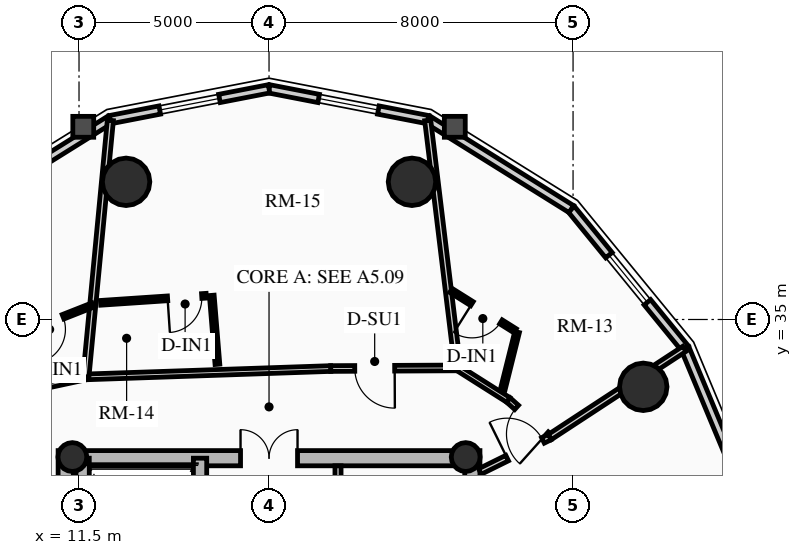
"""IFC4 building model, lengths in metres.
Left out: names, types, materials, properties, quantities, classifications, styles, units other than length and angle.
Written with IfcOpenShell. Run it as: python <this file> out.ifc"""

import sys

from ifc_helpers import new_model, si_unit, direction, frame, frame_2d, origin, origin_2d, place, context, subcontext, project, spatial, rectangle, circle, hollow_circle, extrude, source, transform, mapped, element, fill, save


model = new_model("IFC4")
c1 = context("Model", 3, precision=1e-05, world=origin(), true_north=direction((0.0, 1.0)))
c2 = subcontext(c1, "Body", "Model", "MODEL_VIEW")
j1 = project(units=[si_unit("LENGTHUNIT", "METRE"), si_unit("PLANEANGLEUNIT", "RADIAN")], contexts=[c1])
p1 = place(None, origin())
s1 = spatial("IfcSite", under=j1, at=p1, CompositionType="ELEMENT")
p2 = place(p1, origin())
s2 = spatial("IfcBuilding", under=s1, at=p2, CompositionType="ELEMENT")
p3 = place(p2, frame((0.0, 0.0, 183.61)))
s3 = spatial("IfcBuildingStorey", under=s2, at=p3, CompositionType="ELEMENT", Elevation=183.61)
for number, where, z_axis, x_axis in (
    (1, (11.15, 17.45, 0.0), (0.0, 0.0, 1.0), (0.0, 1.0, 0.0)),
    (2, (21.85, 17.45, 0.0), (0.0, 0.0, 1.0), (0.0, 1.0, 0.0)),
):
    element("IfcWall", number, at=place(p3, frame(where, z_axis=z_axis, x_axis=x_axis)), inside=s3, PredefinedType="SHEAR", context=c2, shape_type="SweptSolid", body=[
        extrude(rectangle(XDim=14.1, YDim=0.4, at=frame_2d((7.05, 0.0))), origin(), (0.0, 0.0, 1.0), 2.91),
    ])
p4 = place(p3, frame((11.15, 31.35, 0.0), z_axis=(0.0, 0.0, 1.0), x_axis=(1.0, 0.0, 0.0)))
e3 = element("IfcWall", 3, at=p4, inside=s3, PredefinedType="SHEAR", context=c2, shape_type="SweptSolid", body=[
    extrude(rectangle(XDim=10.7, YDim=0.4, at=frame_2d((5.35, 0.0))), origin(), (0.0, 0.0, 1.0), 2.91),
])
m1 = source(origin(), c2, "Body", "SweptSolid", [
    extrude(rectangle(XDim=1.5, YDim=2.02, at=frame_2d((0.75, 1.01))), frame((0.0, 0.21, 0.0), z_axis=(0.0, -1.0, 0.0), x_axis=(1.0, 0.0, 0.0)), (0.0, 0.0, 1.0), 0.42),
])
p5 = place(p4, frame((4.6, 0.0, 0.0)))
e4 = element("IfcOpeningElement", 4, at=p5, cuts=e3, PredefinedType="OPENING", context=c2, shape_type="MappedRepresentation", body=[
    mapped(m1, transform((0.0, 0.0, 0.0), x_axis=(1.0, 0.0, 0.0), y_axis=(0.0, 1.0, 0.0), z_axis=(0.0, 0.0, 1.0), scale=1.0)),
])
p6 = place(p3, frame((14.685, 17.65, 0.0), z_axis=(0.0, 0.0, 1.0), x_axis=(0.0, 1.0, 0.0)))
e5 = element("IfcWall", 5, at=p6, inside=s3, PredefinedType="SHEAR", context=c2, shape_type="SweptSolid", body=[
    extrude(rectangle(XDim=13.7, YDim=0.35, at=frame_2d((6.85, 0.0))), origin(), (0.0, 0.0, 1.0), 2.91),
])
m2 = source(origin(), c2, "Body", "SweptSolid", [
    extrude(rectangle(XDim=1.1, YDim=2.015, at=frame_2d((0.55, 1.007))), frame((0.0, 0.185, 0.0), z_axis=(0.0, -1.0, 0.0), x_axis=(1.0, 0.0, 0.0)), (0.0, 0.0, 1.0), 0.37),
])
p7 = place(p6, frame((4.85, 0.0, 0.0)))
e6 = element("IfcOpeningElement", 6, at=p7, cuts=e5, PredefinedType="OPENING", context=c2, shape_type="MappedRepresentation", body=[
    mapped(m2, transform((0.0, 0.0, 0.0), x_axis=(1.0, 0.0, 0.0), y_axis=(0.0, 1.0, 0.0), z_axis=(0.0, 0.0, 1.0), scale=1.0)),
])
p8 = place(p6, frame((0.625, 0.0, 0.0)))
e7 = element("IfcOpeningElement", 7, at=p8, cuts=e5, PredefinedType="OPENING", context=c2, shape_type="MappedRepresentation", body=[
    mapped(m2, transform((0.0, 0.0, 0.0), x_axis=(1.0, 0.0, 0.0), y_axis=(0.0, 1.0, 0.0), z_axis=(0.0, 0.0, 1.0), scale=1.0)),
])
p9 = place(p6, frame((2.625, 0.0, 0.0)))
e8 = element("IfcOpeningElement", 8, at=p9, cuts=e5, PredefinedType="OPENING", context=c2, shape_type="MappedRepresentation", body=[
    mapped(m2, transform((0.0, 0.0, 0.0), x_axis=(1.0, 0.0, 0.0), y_axis=(0.0, 1.0, 0.0), z_axis=(0.0, 0.0, 1.0), scale=1.0)),
])
m3 = source(origin(), c2, "Body", "SweptSolid", [
    extrude(rectangle(XDim=1.15, YDim=2.02, at=frame_2d((0.575, 1.01))), frame((0.0, 0.185, 0.0), z_axis=(0.0, -1.0, 0.0), x_axis=(1.0, 0.0, 0.0)), (0.0, 0.0, 1.0), 0.37),
])
p10 = place(p6, frame((7.27, 0.0, 0.0)))
e9 = element("IfcOpeningElement", 9, at=p10, cuts=e5, PredefinedType="OPENING", context=c2, shape_type="MappedRepresentation", body=[
    mapped(m3, transform((0.0, 0.0, 0.0), x_axis=(1.0, 0.0, 0.0), y_axis=(0.0, 1.0, 0.0), z_axis=(0.0, 0.0, 1.0), scale=1.0)),
])
p11 = place(p3, frame((11.595, 24.655, 0.0), z_axis=(0.0, 0.0, 1.0), x_axis=(0.0, 1.0, 0.0)))
e10 = element("IfcWall", 10, at=p11, inside=s3, PredefinedType="SHEAR", context=c2, shape_type="SweptSolid", body=[
    extrude(rectangle(XDim=6.695, YDim=0.35, at=frame_2d((3.348, 0.0))), origin(), (0.0, 0.0, 1.0), 2.91),
])
for number, where, z_axis, x_axis in (
    (11, (11.325, 31.38, 0.0), (0.0, 0.0, 1.0), (1.0, 0.0, 0.0)),
    (12, (21.675, 31.38, 0.0), (0.0, 0.0, 1.0), (1.0, 0.0, 0.0)),
):
    element("IfcColumn", number, at=place(p3, frame(where, z_axis=z_axis, x_axis=x_axis)), inside=s3, PredefinedType="COLUMN", context=c2, shape_type="SweptSolid", body=[
        extrude(hollow_circle(Radius=0.38, WallThickness=0.032, at=origin_2d()), origin(), (0.0, 0.0, 1.0), 2.91),
    ])
for number, where, z_axis, x_axis in (
    (13, (26.347, 33.229, 0.0), (0.0, 0.0, 1.0), (1.0, 0.0, 0.0)),
    (14, (20.261, 38.623, 0.0), (0.0, 0.0, 1.0), (1.0, 0.0, 0.0)),
    (15, (12.739, 38.623, 0.0), (0.0, 0.0, 1.0), (1.0, 0.0, 0.0)),
):
    element("IfcColumn", number, at=place(p3, frame(where, z_axis=z_axis, x_axis=x_axis)), inside=s3, PredefinedType="USERDEFINED", context=c2, shape_type="SweptSolid", body=[
        extrude(circle(Radius=0.625, at=origin_2d()), origin(), (0.0, 0.0, 1.0), 2.91),
    ])
p12 = place(p3, frame((27.447, 34.24, 0.0), z_axis=(0.0, 0.0, 1.0), x_axis=(0.384144094086, -0.923273152961, 0.0)))
e16 = element("IfcWall", 16, at=p12, inside=s3, PredefinedType="SOLIDWALL", context=c2, shape_type="SweptSolid", body=[
    extrude(rectangle(XDim=5.003, YDim=0.22, at=frame_2d((2.501, 0.0))), origin(), (0.0, 0.0, 1.0), 2.245),
])
p13 = place(p3, frame((24.453, 37.906, 0.0), z_axis=(0.0, 0.0, 1.0), x_axis=(0.632470615287, -0.774584353572, 0.0)))
e17 = element("IfcWall", 17, at=p13, inside=s3, PredefinedType="SOLIDWALL", context=c2, shape_type="SweptSolid", body=[
    extrude(rectangle(XDim=4.733, YDim=0.22, at=frame_2d((2.366, 0.0))), origin(), (0.0, 0.0, 1.0), 2.245),
])
m4 = source(origin(), c2, "Body", "SweptSolid", [
    extrude(rectangle(XDim=1.6, YDim=1.3, at=frame_2d((0.8, 0.65))), frame((0.0, 0.12, 0.0), z_axis=(0.0, -1.0, 0.0), x_axis=(1.0, 0.0, 0.0)), (0.0, 0.0, 1.0), 0.24),
])
p14 = place(p13, frame((1.566, 0.0, 0.65)))
e18 = element("IfcOpeningElement", 18, at=p14, cuts=e17, PredefinedType="OPENING", context=c2, shape_type="MappedRepresentation", body=[
    mapped(m4, transform((0.0, 0.0, 0.0), x_axis=(1.0, 0.0, 0.0), y_axis=(0.0, 1.0, 0.0), z_axis=(0.0, 0.0, 1.0), scale=1.0)),
])
p15 = place(p3, frame((20.681, 40.259, 0.0), z_axis=(0.0, 0.0, 1.0), x_axis=(0.848399108042, -0.529357113368, 0.0)))
e19 = element("IfcWall", 19, at=p15, inside=s3, PredefinedType="SOLIDWALL", context=c2, shape_type="SweptSolid", body=[
    extrude(rectangle(XDim=4.446, YDim=0.22, at=frame_2d((2.223, 0.0))), origin(), (0.0, 0.0, 1.0), 2.245),
])
p16 = place(p3, frame((16.5, 41.07, 0.0), z_axis=(0.0, 0.0, 1.0), x_axis=(0.981703883443, -0.190413983815, 0.0)))
e20 = element("IfcWall", 20, at=p16, inside=s3, PredefinedType="SOLIDWALL", context=c2, shape_type="SweptSolid", body=[
    extrude(rectangle(XDim=4.259, YDim=0.22, at=frame_2d((2.13, 0.0))), origin(), (0.0, 0.0, 1.0), 2.245),
])
p17 = place(p16, frame((1.33, 0.0, 0.65)))
e21 = element("IfcOpeningElement", 21, at=p17, cuts=e20, PredefinedType="OPENING", context=c2, shape_type="MappedRepresentation", body=[
    mapped(m4, transform((0.0, 0.0, 0.0), x_axis=(1.0, 0.0, 0.0), y_axis=(0.0, 1.0, 0.0), z_axis=(0.0, 0.0, 1.0), scale=1.0)),
])
p18 = place(p3, frame((12.319, 40.259, 0.0), z_axis=(0.0, 0.0, 1.0), x_axis=(0.981703883443, 0.190413983815, 0.0)))
e22 = element("IfcWall", 22, at=p18, inside=s3, PredefinedType="SOLIDWALL", context=c2, shape_type="SweptSolid", body=[
    extrude(rectangle(XDim=4.259, YDim=0.22, at=frame_2d((2.13, 0.0))), origin(), (0.0, 0.0, 1.0), 2.245),
])
p19 = place(p18, frame((1.33, 0.0, 0.65)))
e23 = element("IfcOpeningElement", 23, at=p19, cuts=e22, PredefinedType="OPENING", context=c2, shape_type="MappedRepresentation", body=[
    mapped(m4, transform((0.0, 0.0, 0.0), x_axis=(1.0, 0.0, 0.0), y_axis=(0.0, 1.0, 0.0), z_axis=(0.0, 0.0, 1.0), scale=1.0)),
])
p20 = place(p3, frame((8.547, 37.906, 0.0), z_axis=(0.0, 0.0, 1.0), x_axis=(0.848399108042, 0.529357113368, 0.0)))
e24 = element("IfcWall", 24, at=p20, inside=s3, PredefinedType="SOLIDWALL", context=c2, shape_type="SweptSolid", body=[
    extrude(rectangle(XDim=4.446, YDim=0.22, at=frame_2d((2.223, 0.0))), origin(), (0.0, 0.0, 1.0), 2.245),
])
p21 = place(p3, frame((18.315, 27.25, 0.0), z_axis=(0.0, 0.0, 1.0), x_axis=(0.0, 1.0, 0.0)))
e25 = element("IfcWall", 25, at=p21, inside=s3, PredefinedType="PARTITIONING", context=c2, shape_type="SweptSolid", body=[
    extrude(rectangle(XDim=3.9, YDim=0.16, at=frame_2d((1.95, 0.0))), origin(), (0.0, 0.0, 1.0), 2.675),
])
m5 = source(origin(), c2, "Body", "SweptSolid", [
    extrude(rectangle(XDim=0.9, YDim=2.005, at=frame_2d((0.45, 1.002))), frame((0.0, 0.09, 0.0), z_axis=(0.0, -1.0, 0.0), x_axis=(1.0, 0.0, 0.0)), (0.0, 0.0, 1.0), 0.18),
])
p22 = place(p21, frame((0.55, 0.0, 0.0)))
e26 = element("IfcOpeningElement", 26, at=p22, cuts=e25, PredefinedType="OPENING", context=c2, shape_type="MappedRepresentation", body=[
    mapped(m5, transform((0.0, 0.0, 0.0), x_axis=(1.0, 0.0, 0.0), y_axis=(0.0, 1.0, 0.0), z_axis=(0.0, 0.0, 1.0), scale=1.0)),
])
p23 = place(p21, frame((2.35, 0.0, 0.0)))
e27 = element("IfcOpeningElement", 27, at=p23, cuts=e25, PredefinedType="OPENING", context=c2, shape_type="MappedRepresentation", body=[
    mapped(m5, transform((0.0, 0.0, 0.0), x_axis=(1.0, 0.0, 0.0), y_axis=(0.0, 1.0, 0.0), z_axis=(0.0, 0.0, 1.0), scale=1.0)),
])
p24 = place(p3, frame((23.887, 31.906, 0.0), z_axis=(0.0, 0.0, 1.0), x_axis=(-0.744900957214, 0.66717506244, 0.0)))
e28 = element("IfcWall", 28, at=p24, inside=s3, PredefinedType="PARTITIONING", context=c2, shape_type="SweptSolid", body=[
    extrude(rectangle(XDim=1.464, YDim=0.15, at=frame_2d((0.732, 0.0))), origin(), (0.0, 0.0, 1.0), 2.245),
])
m6 = source(origin(), c2, "Body", "SweptSolid", [
    extrude(rectangle(XDim=1.05, YDim=2.015, at=frame_2d((0.525, 1.007))), frame((0.0, 0.085, 0.0), z_axis=(0.0, -1.0, 0.0), x_axis=(1.0, 0.0, 0.0)), (0.0, 0.0, 1.0), 0.17),
])
p25 = place(p24, frame((0.12, 0.0, 0.0)))
e29 = element("IfcOpeningElement", 29, at=p25, cuts=e28, PredefinedType="OPENING", context=c2, shape_type="MappedRepresentation", body=[
    mapped(m6, transform((0.0, 0.0, 0.0), x_axis=(1.0, 0.0, 0.0), y_axis=(0.0, 1.0, 0.0), z_axis=(0.0, 0.0, 1.0), scale=1.0)),
])
p26 = place(p3, frame((22.797, 32.883, 0.0), z_axis=(0.0, 0.0, 1.0), x_axis=(-0.84484009232, 0.535018895375, 0.0)))
e30 = element("IfcWall", 30, at=p26, inside=s3, PredefinedType="PARTITIONING", context=c2, shape_type="SweptSolid", body=[
    extrude(rectangle(XDim=1.575, YDim=0.15, at=frame_2d((0.788, 0.0))), origin(), (0.0, 0.0, 1.0), 2.245),
])
p27 = place(p3, frame((21.466, 33.726, 0.0), z_axis=(0.0, 0.0, 1.0), x_axis=(-0.99998838579, -0.004819573058, 0.0)))
e31 = element("IfcWall", 31, at=p27, inside=s3, PredefinedType="PARTITIONING", context=c2, shape_type="SweptSolid", body=[
    extrude(rectangle(XDim=3.343, YDim=0.15, at=frame_2d((1.672, 0.0))), origin(), (0.0, 0.0, 1.0), 2.245),
])
p28 = place(p27, frame((1.66, 0.0, 0.0)))
e32 = element("IfcOpeningElement", 32, at=p28, cuts=e31, PredefinedType="OPENING", context=c2, shape_type="MappedRepresentation", body=[
    mapped(m6, transform((0.0, 0.0, 0.0), x_axis=(1.0, 0.0, 0.0), y_axis=(0.0, 1.0, 0.0), z_axis=(0.0, 0.0, 1.0), scale=1.0)),
])
p29 = place(p3, frame((18.123, 33.709, 0.0), z_axis=(0.0, 0.0, 1.0), x_axis=(-0.999417459976, -0.034128297572, 0.0)))
e33 = element("IfcWall", 33, at=p29, inside=s3, PredefinedType="PARTITIONING", context=c2, shape_type="SweptSolid", body=[
    extrude(rectangle(XDim=6.445, YDim=0.15, at=frame_2d((3.223, 0.0))), origin(), (0.0, 0.0, 1.0), 2.245),
])
p30 = place(p3, frame((11.681, 33.49, 0.0), z_axis=(0.0, 0.0, 1.0), x_axis=(-0.977628265995, -0.2103401377, 0.0)))
e34 = element("IfcWall", 34, at=p30, inside=s3, PredefinedType="PARTITIONING", context=c2, shape_type="SweptSolid", body=[
    extrude(rectangle(XDim=1.912, YDim=0.15, at=frame_2d((0.956, 0.0))), origin(), (0.0, 0.0, 1.0), 2.245),
])
p31 = place(p3, frame((23.887, 31.906, 0.0), z_axis=(0.0, 0.0, 1.0), x_axis=(0.836482991446, 0.547992887748, 0.0)))
e35 = element("IfcWall", 35, at=p31, inside=s3, PredefinedType="PARTITIONING", context=c2, shape_type="SweptSolid", body=[
    extrude(rectangle(XDim=4.236, YDim=0.16, at=frame_2d((2.118, 0.0))), origin(), (0.0, 0.0, 1.0), 2.245),
])
p32 = place(p3, frame((21.466, 33.726, 0.0), z_axis=(0.0, 0.0, 1.0), x_axis=(-0.12050358126, 0.992712892484, 0.0)))
e36 = element("IfcWall", 36, at=p32, inside=s3, PredefinedType="PARTITIONING", context=c2, shape_type="SweptSolid", body=[
    extrude(rectangle(XDim=6.562, YDim=0.16, at=frame_2d((3.281, 0.0))), origin(), (0.0, 0.0, 1.0), 2.245),
])
p33 = place(p3, frame((11.681, 33.49, 0.0), z_axis=(0.0, 0.0, 1.0), x_axis=(0.094975594504, 0.995479601222, 0.0)))
e37 = element("IfcWall", 37, at=p33, inside=s3, PredefinedType="PARTITIONING", context=c2, shape_type="SweptSolid", body=[
    extrude(rectangle(XDim=6.781, YDim=0.16, at=frame_2d((3.391, 0.0))), origin(), (0.0, 0.0, 1.0), 2.245),
])
p34 = place(p3, frame((22.05, 31.0, 0.0), z_axis=(0.0, 0.0, 1.0), x_axis=(0.896798317999, 0.442439574218, 0.0)))
e38 = element("IfcWall", 38, at=p34, inside=s3, PredefinedType="PARTITIONING", context=c2, shape_type="SweptSolid", body=[
    extrude(rectangle(XDim=2.048, YDim=0.16, at=frame_2d((1.024, 0.0))), origin(), (0.0, 0.0, 1.0), 2.245),
])
m7 = source(origin(), c2, "Body", "SweptSolid", [
    extrude(rectangle(XDim=1.05, YDim=2.015, at=frame_2d((0.525, 1.007))), frame((0.0, 0.09, 0.0), z_axis=(0.0, -1.0, 0.0), x_axis=(1.0, 0.0, 0.0)), (0.0, 0.0, 1.0), 0.18),
])
p35 = place(p34, frame((0.798, 0.0, 0.0)))
e39 = element("IfcOpeningElement", 39, at=p35, cuts=e38, PredefinedType="OPENING", context=c2, shape_type="MappedRepresentation", body=[
    mapped(m7, transform((0.0, 0.0, 0.0), x_axis=(1.0, 0.0, 0.0), y_axis=(0.0, 1.0, 0.0), z_axis=(0.0, 0.0, 1.0), scale=1.0)),
])
p36 = place(p3, frame((22.649, 33.157, 0.0), z_axis=(0.0, 0.0, 1.0), x_axis=(0.242461964074, 0.970160912415, 0.0)))
e40 = element("IfcWall", 40, at=p36, inside=s3, PredefinedType="PARTITIONING", context=c2, shape_type="SweptSolid", body=[
    extrude(rectangle(XDim=1.56, YDim=0.125, at=frame_2d((0.78, 0.0))), origin(), (0.0, 0.0, 1.0), 2.245),
])
p37 = place(p3, frame((22.975, 34.704, 0.0), z_axis=(0.0, 0.0, 1.0), x_axis=(-0.84683355027, 0.531858005615, 0.0)))
e41 = element("IfcWall", 41, at=p37, inside=s3, PredefinedType="PARTITIONING", context=c2, shape_type="SweptSolid", body=[
    extrude(rectangle(XDim=1.994, YDim=0.125, at=frame_2d((0.997, 0.0))), origin(), (0.0, 0.0, 1.0), 2.675),
])
m8 = source(origin(), c2, "Body", "SweptSolid", [
    extrude(rectangle(XDim=0.9, YDim=2.005, at=frame_2d((0.45, 1.002))), frame((0.0, 0.073, 0.0), z_axis=(0.0, -1.0, 0.0), x_axis=(1.0, 0.0, 0.0)), (0.0, 0.0, 1.0), 0.145),
])
p38 = place(p37, frame((0.44, 0.0, 0.0)))
e42 = element("IfcOpeningElement", 42, at=p38, cuts=e41, PredefinedType="OPENING", context=c2, shape_type="MappedRepresentation", body=[
    mapped(m8, transform((0.0, 0.0, 0.0), x_axis=(1.0, 0.0, 0.0), y_axis=(0.0, 1.0, 0.0), z_axis=(0.0, 0.0, 1.0), scale=1.0)),
])
p39 = place(p3, frame((15.142, 33.82, 0.0), z_axis=(0.0, 0.0, 1.0), x_axis=(-0.081791493646, 0.996649462734, 0.0)))
e43 = element("IfcWall", 43, at=p39, inside=s3, PredefinedType="PARTITIONING", context=c2, shape_type="SweptSolid", body=[
    extrude(rectangle(XDim=1.821, YDim=0.125, at=frame_2d((0.91, 0.0))), origin(), (0.0, 0.0, 1.0), 2.675),
])
p40 = place(p3, frame((14.848, 35.625, 0.0), z_axis=(0.0, 0.0, 1.0), x_axis=(-0.997750908336, -0.067030775874, 0.0)))
e44 = element("IfcWall", 44, at=p40, inside=s3, PredefinedType="PARTITIONING", context=c2, shape_type="SweptSolid", body=[
    extrude(rectangle(XDim=2.786, YDim=0.125, at=frame_2d((1.393, 0.0))), origin(), (0.0, 0.0, 1.0), 2.245),
])
p41 = place(p40, frame((0.12, 0.0, 0.0)))
e45 = element("IfcOpeningElement", 45, at=p41, cuts=e44, PredefinedType="OPENING", context=c2, shape_type="MappedRepresentation", body=[
    mapped(m8, transform((0.0, 0.0, 0.0), x_axis=(1.0, 0.0, 0.0), y_axis=(0.0, 1.0, 0.0), z_axis=(0.0, 0.0, 1.0), scale=1.0)),
])
p42 = place(p3, frame((11.861, 35.38, 0.0), z_axis=(0.0, 0.0, 1.0), x_axis=(-0.930124609977, -0.367244074037, 0.0)))
e46 = element("IfcWall", 46, at=p42, inside=s3, PredefinedType="PARTITIONING", context=c2, shape_type="SweptSolid", body=[
    extrude(rectangle(XDim=2.581, YDim=0.125, at=frame_2d((1.291, 0.0))), origin(), (0.0, 0.0, 1.0), 2.245),
])
p43 = place(p42, frame((0.84, 0.0, 0.0)))
e47 = element("IfcOpeningElement", 47, at=p43, cuts=e46, PredefinedType="OPENING", context=c2, shape_type="MappedRepresentation", body=[
    mapped(m8, transform((0.0, 0.0, 0.0), x_axis=(1.0, 0.0, 0.0), y_axis=(0.0, 1.0, 0.0), z_axis=(0.0, 0.0, 1.0), scale=1.0)),
])
m9 = source(origin(), c2, "Body", "SweptSolid", [
    extrude(rectangle(XDim=1.6, YDim=1.3, at=frame_2d((0.8, 0.65))), frame((0.0, 0.03, 0.0), z_axis=(0.0, -1.0, 0.0), x_axis=(1.0, 0.0, 0.0)), (0.0, 0.0, 1.0), 0.06),
])
p44 = place(p14, origin())
e48 = element("IfcWindow", 48, at=p44, inside=s3, PartitioningType="SINGLE_PANEL", PredefinedType="WINDOW", context=c2, shape_type="MappedRepresentation", body=[
    mapped(m9, transform((0.0, 0.0, 0.0), x_axis=(1.0, 0.0, 0.0), y_axis=(0.0, 1.0, 0.0), z_axis=(0.0, 0.0, 1.0), scale=1.0)),
])
fill(e18, e48)
p45 = place(p17, origin())
e49 = element("IfcWindow", 49, at=p45, inside=s3, PartitioningType="SINGLE_PANEL", PredefinedType="WINDOW", context=c2, shape_type="MappedRepresentation", body=[
    mapped(m9, transform((0.0, 0.0, 0.0), x_axis=(1.0, 0.0, 0.0), y_axis=(0.0, 1.0, 0.0), z_axis=(0.0, 0.0, 1.0), scale=1.0)),
])
fill(e21, e49)
p46 = place(p19, origin())
e50 = element("IfcWindow", 50, at=p46, inside=s3, PartitioningType="SINGLE_PANEL", PredefinedType="WINDOW", context=c2, shape_type="MappedRepresentation", body=[
    mapped(m9, transform((0.0, 0.0, 0.0), x_axis=(1.0, 0.0, 0.0), y_axis=(0.0, 1.0, 0.0), z_axis=(0.0, 0.0, 1.0), scale=1.0)),
])
fill(e23, e50)
m10 = source(origin(), c2, "Body", "SweptSolid", [
    extrude(rectangle(XDim=1.5, YDim=2.02, at=frame_2d((0.75, 1.01))), frame((0.0, 0.025, 0.0), z_axis=(0.0, -1.0, 0.0), x_axis=(1.0, 0.0, 0.0)), (0.0, 0.0, 1.0), 0.05),
])
p47 = place(p5, origin())
e51 = element("IfcDoor", 51, at=p47, inside=s3, OperationType="DOUBLE_DOOR_SINGLE_SWING", PredefinedType="DOOR", context=c2, shape_type="MappedRepresentation", body=[
    mapped(m10, transform((0.0, 0.0, 0.0), x_axis=(1.0, 0.0, 0.0), y_axis=(0.0, 1.0, 0.0), z_axis=(0.0, 0.0, 1.0), scale=1.0)),
])
fill(e4, e51)
m11 = source(origin(), c2, "Body", "SweptSolid", [
    extrude(rectangle(XDim=1.05, YDim=2.015, at=frame_2d((0.525, 1.007))), frame((0.0, 0.025, 0.0), z_axis=(0.0, -1.0, 0.0), x_axis=(1.0, 0.0, 0.0)), (0.0, 0.0, 1.0), 0.05),
])
p48 = place(p35, origin())
e52 = element("IfcDoor", 52, at=p48, inside=s3, OperationType="SINGLE_SWING_LEFT", PredefinedType="DOOR", context=c2, shape_type="MappedRepresentation", body=[
    mapped(m11, transform((0.0, 0.0, 0.0), x_axis=(1.0, 0.0, 0.0), y_axis=(0.0, 1.0, 0.0), z_axis=(0.0, 0.0, 1.0), scale=1.0)),
])
fill(e39, e52)
p49 = place(p25, origin())
e53 = element("IfcDoor", 53, at=p49, inside=s3, OperationType="SINGLE_SWING_LEFT", PredefinedType="DOOR", context=c2, shape_type="MappedRepresentation", body=[
    mapped(m11, transform((0.0, 0.0, 0.0), x_axis=(1.0, 0.0, 0.0), y_axis=(0.0, 1.0, 0.0), z_axis=(0.0, 0.0, 1.0), scale=1.0)),
])
fill(e29, e53)
m12 = source(origin(), c2, "Body", "SweptSolid", [
    extrude(rectangle(XDim=0.9, YDim=2.005, at=frame_2d((0.45, 1.002))), frame((0.0, 0.025, 0.0), z_axis=(0.0, -1.0, 0.0), x_axis=(1.0, 0.0, 0.0)), (0.0, 0.0, 1.0), 0.05),
])
p50 = place(p38, origin())
e54 = element("IfcDoor", 54, at=p50, inside=s3, OperationType="SINGLE_SWING_RIGHT", PredefinedType="DOOR", context=c2, shape_type="MappedRepresentation", body=[
    mapped(m12, transform((0.0, 0.0, 0.0), x_axis=(1.0, 0.0, 0.0), y_axis=(0.0, 1.0, 0.0), z_axis=(0.0, 0.0, 1.0), scale=1.0)),
])
fill(e42, e54)
p51 = place(p28, origin())
e55 = element("IfcDoor", 55, at=p51, inside=s3, OperationType="SINGLE_SWING_LEFT", PredefinedType="DOOR", context=c2, shape_type="MappedRepresentation", body=[
    mapped(m11, transform((0.0, 0.0, 0.0), x_axis=(1.0, 0.0, 0.0), y_axis=(0.0, 1.0, 0.0), z_axis=(0.0, 0.0, 1.0), scale=1.0)),
])
fill(e32, e55)
p52 = place(p41, origin())
e56 = element("IfcDoor", 56, at=p52, inside=s3, OperationType="SINGLE_SWING_RIGHT", PredefinedType="DOOR", context=c2, shape_type="MappedRepresentation", body=[
    mapped(m12, transform((0.0, 0.0, 0.0), x_axis=(1.0, 0.0, 0.0), y_axis=(0.0, 1.0, 0.0), z_axis=(0.0, 0.0, 1.0), scale=1.0)),
])
fill(e45, e56)
p53 = place(p43, origin())
e57 = element("IfcDoor", 57, at=p53, inside=s3, OperationType="SINGLE_SWING_RIGHT", PredefinedType="DOOR", context=c2, shape_type="MappedRepresentation", body=[
    mapped(m12, transform((0.0, 0.0, 0.0), x_axis=(1.0, 0.0, 0.0), y_axis=(0.0, 1.0, 0.0), z_axis=(0.0, 0.0, 1.0), scale=1.0)),
])
fill(e47, e57)
save(model, sys.argv[1])
